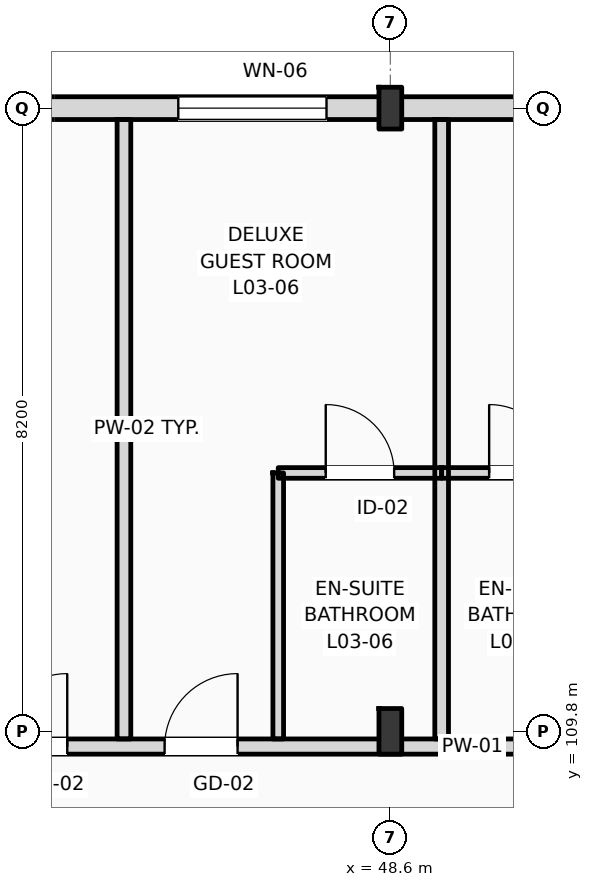
"""IFC4 building model, lengths in metres.
Left out: names, types, materials, properties, quantities, classifications, styles, units other than length and angle.
Written with IfcOpenShell. Run it as: python <this file> out.ifc"""

import sys

from ifc_helpers import new_model, si_unit, direction, frame, frame_2d, origin, origin_2d, place, context, subcontext, project, spatial, rectangle, i_section, extrude, element, fill, save


model = new_model("IFC4")
c1 = context("Model", 3, precision=1e-05, world=origin(), true_north=direction((0.0, 1.0)))
c2 = subcontext(c1, "Body", "Model", "MODEL_VIEW")
j1 = project(units=[si_unit("LENGTHUNIT", "METRE"), si_unit("PLANEANGLEUNIT", "RADIAN")], contexts=[c1])
p1 = place(None, origin())
s1 = spatial("IfcSite", under=j1, at=p1, CompositionType="ELEMENT")
p2 = place(p1, origin())
s2 = spatial("IfcBuilding", under=s1, at=p2, CompositionType="ELEMENT")
p3 = place(p2, frame((0.0, 0.0, 16.2)))
s3 = spatial("IfcBuildingStorey", under=s2, at=p3, CompositionType="ELEMENT", Elevation=16.2)
p4 = place(p3, frame((48.6, 109.8, 0.0), z_axis=(0.0, 0.0, 1.0), x_axis=(1.0, 0.0, 0.0)))
e1 = element("IfcColumn", 1, at=p4, inside=s3, PredefinedType="COLUMN", context=c2, shape_type="SweptSolid", body=[
    extrude(i_section(OverallWidth=0.3, OverallDepth=0.6, WebThickness=0.015, FlangeThickness=0.03, FilletRadius=0.027, at=origin_2d()), origin(), (0.0, 0.0, 1.0), 4.2),
])
p5 = place(p3, frame((48.6, 118.0, 0.0), z_axis=(0.0, 0.0, 1.0), x_axis=(1.0, 0.0, 0.0)))
e2 = element("IfcColumn", 2, at=p5, inside=s3, PredefinedType="COLUMN", context=c2, shape_type="SweptSolid", body=[
    extrude(i_section(OverallWidth=0.3, OverallDepth=0.55, WebThickness=0.015, FlangeThickness=0.029, FilletRadius=0.027, at=origin_2d()), origin(), (0.0, 0.0, 1.0), 4.2),
])
p6 = place(p3, frame((22.5, 118.0, 0.0), z_axis=(0.0, 0.0, 1.0), x_axis=(1.0, 0.0, 0.0)))
e3 = element("IfcWall", 3, at=p6, inside=s3, PredefinedType="STANDARD", context=c2, shape_type="SweptSolid", body=[
    extrude(rectangle(XDim=97.5, YDim=0.3, at=frame_2d((48.75, 0.0))), origin(), (0.0, 0.0, 1.0), 3.36),
])
p7 = place(p6, frame((3.721, 0.0, 0.9)))
e4 = element("IfcOpeningElement", 4, at=p7, cuts=e3, PredefinedType="OPENING", context=c2, shape_type="SweptSolid", body=[
    extrude(rectangle(XDim=0.9, YDim=1.8, at=frame_2d((0.45, 0.9))), frame((0.0, 0.16, 0.0), z_axis=(0.0, -1.0, 0.0), x_axis=(1.0, 0.0, 0.0)), (0.0, 0.0, 1.0), 0.32),
])
p8 = place(p6, frame((6.447, 0.0, 0.9)))
e5 = element("IfcOpeningElement", 5, at=p8, cuts=e3, PredefinedType="OPENING", context=c2, shape_type="SweptSolid", body=[
    extrude(rectangle(XDim=1.35, YDim=1.85, at=frame_2d((0.675, 0.925))), frame((0.0, 0.16, 0.0), z_axis=(0.0, -1.0, 0.0), x_axis=(1.0, 0.0, 0.0)), (0.0, 0.0, 1.0), 0.32),
])
p9 = place(p6, frame((11.363, 0.0, 0.9)))
e6 = element("IfcOpeningElement", 6, at=p9, cuts=e3, PredefinedType="OPENING", context=c2, shape_type="SweptSolid", body=[
    extrude(rectangle(XDim=1.5, YDim=1.9, at=frame_2d((0.75, 0.95))), frame((0.0, 0.16, 0.0), z_axis=(0.0, -1.0, 0.0), x_axis=(1.0, 0.0, 0.0)), (0.0, 0.0, 1.0), 0.32),
])
p10 = place(p6, frame((15.078, 0.0, 0.9)))
e7 = element("IfcOpeningElement", 7, at=p10, cuts=e3, PredefinedType="OPENING", context=c2, shape_type="SweptSolid", body=[
    extrude(rectangle(XDim=1.65, YDim=1.95, at=frame_2d((0.825, 0.975))), frame((0.0, 0.16, 0.0), z_axis=(0.0, -1.0, 0.0), x_axis=(1.0, 0.0, 0.0)), (0.0, 0.0, 1.0), 0.32),
])
p11 = place(p6, frame((19.395, 0.0, 0.9)))
e8 = element("IfcOpeningElement", 8, at=p11, cuts=e3, PredefinedType="OPENING", context=c2, shape_type="SweptSolid", body=[
    extrude(rectangle(XDim=1.8, YDim=2.0, at=frame_2d((0.9, 1.0))), frame((0.0, 0.16, 0.0), z_axis=(0.0, -1.0, 0.0), x_axis=(1.0, 0.0, 0.0)), (0.0, 0.0, 1.0), 0.32),
])
p12 = place(p6, frame((23.31, 0.0, 0.9)))
e9 = element("IfcOpeningElement", 9, at=p12, cuts=e3, PredefinedType="OPENING", context=c2, shape_type="SweptSolid", body=[
    extrude(rectangle(XDim=1.95, YDim=2.05, at=frame_2d((0.975, 1.025))), frame((0.0, 0.16, 0.0), z_axis=(0.0, -1.0, 0.0), x_axis=(1.0, 0.0, 0.0)), (0.0, 0.0, 1.0), 0.32),
])
p13 = place(p6, frame((28.026, 0.0, 0.9)))
e10 = element("IfcOpeningElement", 10, at=p13, cuts=e3, PredefinedType="OPENING", context=c2, shape_type="SweptSolid", body=[
    extrude(rectangle(XDim=2.1, YDim=2.1, at=frame_2d((1.05, 1.05))), frame((0.0, 0.16, 0.0), z_axis=(0.0, -1.0, 0.0), x_axis=(1.0, 0.0, 0.0)), (0.0, 0.0, 1.0), 0.32),
])
p14 = place(p6, frame((31.941, 0.0, 0.9)))
e11 = element("IfcOpeningElement", 11, at=p14, cuts=e3, PredefinedType="OPENING", context=c2, shape_type="SweptSolid", body=[
    extrude(rectangle(XDim=1.1, YDim=2.15, at=frame_2d((0.55, 1.075))), frame((0.0, 0.16, 0.0), z_axis=(0.0, -1.0, 0.0), x_axis=(1.0, 0.0, 0.0)), (0.0, 0.0, 1.0), 0.32),
])
p15 = place(p6, frame((36.657, 0.0, 0.9)))
e12 = element("IfcOpeningElement", 12, at=p15, cuts=e3, PredefinedType="OPENING", context=c2, shape_type="SweptSolid", body=[
    extrude(rectangle(XDim=2.4, YDim=2.2, at=frame_2d((1.2, 1.1))), frame((0.0, 0.16, 0.0), z_axis=(0.0, -1.0, 0.0), x_axis=(1.0, 0.0, 0.0)), (0.0, 0.0, 1.0), 0.32),
])
p16 = place(p6, frame((42.574, 0.0, 0.9)))
e13 = element("IfcOpeningElement", 13, at=p16, cuts=e3, PredefinedType="OPENING", context=c2, shape_type="SweptSolid", body=[
    extrude(rectangle(XDim=1.35, YDim=2.25, at=frame_2d((0.675, 1.125))), frame((0.0, 0.16, 0.0), z_axis=(0.0, -1.0, 0.0), x_axis=(1.0, 0.0, 0.0)), (0.0, 0.0, 1.0), 0.32),
])
p17 = place(p6, frame((45.289, 0.0, 0.9)))
e14 = element("IfcOpeningElement", 14, at=p17, cuts=e3, PredefinedType="OPENING", context=c2, shape_type="SweptSolid", body=[
    extrude(rectangle(XDim=2.7, YDim=2.28, at=frame_2d((1.35, 1.14))), frame((0.0, 0.16, 0.0), z_axis=(0.0, -1.0, 0.0), x_axis=(1.0, 0.0, 0.0)), (0.0, 0.0, 1.0), 0.32),
])
p18 = place(p6, frame((50.406, 0.0, 0.9)))
e15 = element("IfcOpeningElement", 15, at=p18, cuts=e3, PredefinedType="OPENING", context=c2, shape_type="SweptSolid", body=[
    extrude(rectangle(XDim=1.8, YDim=2.28, at=frame_2d((0.9, 1.14))), frame((0.0, 0.16, 0.0), z_axis=(0.0, -1.0, 0.0), x_axis=(1.0, 0.0, 0.0)), (0.0, 0.0, 1.0), 0.32),
])
p19 = place(p6, frame((53.922, 0.0, 0.9)))
e16 = element("IfcOpeningElement", 16, at=p19, cuts=e3, PredefinedType="OPENING", context=c2, shape_type="SweptSolid", body=[
    extrude(rectangle(XDim=1.8, YDim=2.28, at=frame_2d((0.9, 1.14))), frame((0.0, 0.16, 0.0), z_axis=(0.0, -1.0, 0.0), x_axis=(1.0, 0.0, 0.0)), (0.0, 0.0, 1.0), 0.32),
])
p20 = place(p6, frame((58.332, 0.0, 0.9)))
e17 = element("IfcOpeningElement", 17, at=p20, cuts=e3, PredefinedType="OPENING", context=c2, shape_type="SweptSolid", body=[
    extrude(rectangle(XDim=2.961, YDim=2.28, at=frame_2d((1.48, 1.14))), frame((0.0, 0.16, 0.0), z_axis=(0.0, -1.0, 0.0), x_axis=(1.0, 0.0, 0.0)), (0.0, 0.0, 1.0), 0.32),
])
p21 = place(p6, frame((62.513, 0.0, 0.9)))
e18 = element("IfcOpeningElement", 18, at=p21, cuts=e3, PredefinedType="OPENING", context=c2, shape_type="SweptSolid", body=[
    extrude(rectangle(XDim=1.8, YDim=2.28, at=frame_2d((0.9, 1.14))), frame((0.0, 0.16, 0.0), z_axis=(0.0, -1.0, 0.0), x_axis=(1.0, 0.0, 0.0)), (0.0, 0.0, 1.0), 0.32),
])
p22 = place(p6, frame((67.114, 0.0, 0.9)))
e19 = element("IfcOpeningElement", 19, at=p22, cuts=e3, PredefinedType="OPENING", context=c2, shape_type="SweptSolid", body=[
    extrude(rectangle(XDim=2.961, YDim=2.28, at=frame_2d((1.48, 1.14))), frame((0.0, 0.16, 0.0), z_axis=(0.0, -1.0, 0.0), x_axis=(1.0, 0.0, 0.0)), (0.0, 0.0, 1.0), 0.32),
])
p23 = place(p6, frame((73.695, 0.0, 0.9)))
e20 = element("IfcOpeningElement", 20, at=p23, cuts=e3, PredefinedType="OPENING", context=c2, shape_type="SweptSolid", body=[
    extrude(rectangle(XDim=1.1, YDim=2.28, at=frame_2d((0.55, 1.14))), frame((0.0, 0.16, 0.0), z_axis=(0.0, -1.0, 0.0), x_axis=(1.0, 0.0, 0.0)), (0.0, 0.0, 1.0), 0.32),
])
p24 = place(p6, frame((75.895, 0.0, 0.9)))
e21 = element("IfcOpeningElement", 21, at=p24, cuts=e3, PredefinedType="OPENING", context=c2, shape_type="SweptSolid", body=[
    extrude(rectangle(XDim=2.961, YDim=2.28, at=frame_2d((1.48, 1.14))), frame((0.0, 0.16, 0.0), z_axis=(0.0, -1.0, 0.0), x_axis=(1.0, 0.0, 0.0)), (0.0, 0.0, 1.0), 0.32),
])
p25 = place(p6, frame((81.676, 0.0, 0.9)))
e22 = element("IfcOpeningElement", 22, at=p25, cuts=e3, PredefinedType="OPENING", context=c2, shape_type="SweptSolid", body=[
    extrude(rectangle(XDim=1.8, YDim=2.28, at=frame_2d((0.9, 1.14))), frame((0.0, 0.16, 0.0), z_axis=(0.0, -1.0, 0.0), x_axis=(1.0, 0.0, 0.0)), (0.0, 0.0, 1.0), 0.32),
])
p26 = place(p6, frame((84.677, 0.0, 0.9)))
e23 = element("IfcOpeningElement", 23, at=p26, cuts=e3, PredefinedType="OPENING", context=c2, shape_type="SweptSolid", body=[
    extrude(rectangle(XDim=2.961, YDim=2.28, at=frame_2d((1.48, 1.14))), frame((0.0, 0.16, 0.0), z_axis=(0.0, -1.0, 0.0), x_axis=(1.0, 0.0, 0.0)), (0.0, 0.0, 1.0), 0.32),
])
p27 = place(p6, frame((89.999, 0.0, 0.9)))
e24 = element("IfcOpeningElement", 24, at=p27, cuts=e3, PredefinedType="OPENING", context=c2, shape_type="SweptSolid", body=[
    extrude(rectangle(XDim=1.1, YDim=1.5, at=frame_2d((0.55, 0.75))), frame((0.0, 0.16, 0.0), z_axis=(0.0, -1.0, 0.0), x_axis=(1.0, 0.0, 0.0)), (0.0, 0.0, 1.0), 0.32),
])
p28 = place(p6, frame((94.35, 0.0, 0.9)))
e25 = element("IfcOpeningElement", 25, at=p28, cuts=e3, PredefinedType="OPENING", context=c2, shape_type="SweptSolid", body=[
    extrude(rectangle(XDim=1.25, YDim=1.6, at=frame_2d((0.625, 0.8))), frame((0.0, 0.16, 0.0), z_axis=(0.0, -1.0, 0.0), x_axis=(1.0, 0.0, 0.0)), (0.0, 0.0, 1.0), 0.32),
])
p29 = place(p3, frame((10.65, 109.6, 0.0), z_axis=(0.0, 0.0, 1.0), x_axis=(1.0, 0.0, 0.0)))
e26 = element("IfcWall", 26, at=p29, inside=s3, PredefinedType="PARTITIONING", context=c2, shape_type="SweptSolid", body=[
    extrude(rectangle(XDim=109.21, YDim=0.2, at=frame_2d((54.605, 0.0))), origin(), (0.0, 0.0, 1.0), 3.36),
])
p30 = place(p29, frame((15.43, 0.0, 0.0)))
e27 = element("IfcOpeningElement", 27, at=p30, cuts=e26, PredefinedType="OPENING", context=c2, shape_type="SweptSolid", body=[
    extrude(rectangle(XDim=1.02, YDim=2.2, at=frame_2d((0.51, 1.1))), frame((0.0, 0.11, 0.0), z_axis=(0.0, -1.0, 0.0), x_axis=(1.0, 0.0, 0.0)), (0.0, 0.0, 1.0), 0.22),
])
p31 = place(p29, frame((19.537, 0.0, 0.0)))
e28 = element("IfcOpeningElement", 28, at=p31, cuts=e26, PredefinedType="OPENING", context=c2, shape_type="SweptSolid", body=[
    extrude(rectangle(XDim=1.02, YDim=2.2, at=frame_2d((0.51, 1.1))), frame((0.0, 0.11, 0.0), z_axis=(0.0, -1.0, 0.0), x_axis=(1.0, 0.0, 0.0)), (0.0, 0.0, 1.0), 0.22),
])
p32 = place(p29, frame((23.928, 0.0, 0.0)))
e29 = element("IfcOpeningElement", 29, at=p32, cuts=e26, PredefinedType="OPENING", context=c2, shape_type="SweptSolid", body=[
    extrude(rectangle(XDim=1.02, YDim=2.2, at=frame_2d((0.51, 1.1))), frame((0.0, 0.11, 0.0), z_axis=(0.0, -1.0, 0.0), x_axis=(1.0, 0.0, 0.0)), (0.0, 0.0, 1.0), 0.22),
])
p33 = place(p29, frame((26.169, 0.0, 0.0)))
e30 = element("IfcOpeningElement", 30, at=p33, cuts=e26, PredefinedType="OPENING", context=c2, shape_type="SweptSolid", body=[
    extrude(rectangle(XDim=1.02, YDim=2.2, at=frame_2d((0.51, 1.1))), frame((0.0, 0.11, 0.0), z_axis=(0.0, -1.0, 0.0), x_axis=(1.0, 0.0, 0.0)), (0.0, 0.0, 1.0), 0.22),
])
p34 = place(p29, frame((32.739, 0.0, 0.0)))
e31 = element("IfcOpeningElement", 31, at=p34, cuts=e26, PredefinedType="OPENING", context=c2, shape_type="SweptSolid", body=[
    extrude(rectangle(XDim=0.96, YDim=2.2, at=frame_2d((0.48, 1.1))), frame((0.0, 0.11, 0.0), z_axis=(0.0, -1.0, 0.0), x_axis=(1.0, 0.0, 0.0)), (0.0, 0.0, 1.0), 0.22),
])
p35 = place(p29, frame((34.98, 0.0, 0.0)))
e32 = element("IfcOpeningElement", 32, at=p35, cuts=e26, PredefinedType="OPENING", context=c2, shape_type="SweptSolid", body=[
    extrude(rectangle(XDim=0.96, YDim=2.2, at=frame_2d((0.48, 1.1))), frame((0.0, 0.11, 0.0), z_axis=(0.0, -1.0, 0.0), x_axis=(1.0, 0.0, 0.0)), (0.0, 0.0, 1.0), 0.22),
])
p36 = place(p29, frame((41.521, 0.0, 0.0)))
e33 = element("IfcOpeningElement", 33, at=p36, cuts=e26, PredefinedType="OPENING", context=c2, shape_type="SweptSolid", body=[
    extrude(rectangle(XDim=0.96, YDim=2.2, at=frame_2d((0.48, 1.1))), frame((0.0, 0.11, 0.0), z_axis=(0.0, -1.0, 0.0), x_axis=(1.0, 0.0, 0.0)), (0.0, 0.0, 1.0), 0.22),
])
p37 = place(p29, frame((43.512, 0.0, 0.0)))
e34 = element("IfcOpeningElement", 34, at=p37, cuts=e26, PredefinedType="OPENING", context=c2, shape_type="SweptSolid", body=[
    extrude(rectangle(XDim=0.96, YDim=2.2, at=frame_2d((0.48, 1.1))), frame((0.0, 0.11, 0.0), z_axis=(0.0, -1.0, 0.0), x_axis=(1.0, 0.0, 0.0)), (0.0, 0.0, 1.0), 0.22),
])
p38 = place(p29, frame((50.303, 0.0, 0.0)))
e35 = element("IfcOpeningElement", 35, at=p38, cuts=e26, PredefinedType="OPENING", context=c2, shape_type="SweptSolid", body=[
    extrude(rectangle(XDim=0.96, YDim=2.2, at=frame_2d((0.48, 1.1))), frame((0.0, 0.11, 0.0), z_axis=(0.0, -1.0, 0.0), x_axis=(1.0, 0.0, 0.0)), (0.0, 0.0, 1.0), 0.22),
])
p39 = place(p29, frame((54.944, 0.0, 0.0)))
e36 = element("IfcOpeningElement", 36, at=p39, cuts=e26, PredefinedType="OPENING", context=c2, shape_type="SweptSolid", body=[
    extrude(rectangle(XDim=0.96, YDim=2.2, at=frame_2d((0.48, 1.1))), frame((0.0, 0.11, 0.0), z_axis=(0.0, -1.0, 0.0), x_axis=(1.0, 0.0, 0.0)), (0.0, 0.0, 1.0), 0.22),
])
p40 = place(p29, frame((59.085, 0.0, 0.0)))
e37 = element("IfcOpeningElement", 37, at=p40, cuts=e26, PredefinedType="OPENING", context=c2, shape_type="SweptSolid", body=[
    extrude(rectangle(XDim=0.96, YDim=2.2, at=frame_2d((0.48, 1.1))), frame((0.0, 0.11, 0.0), z_axis=(0.0, -1.0, 0.0), x_axis=(1.0, 0.0, 0.0)), (0.0, 0.0, 1.0), 0.22),
])
p41 = place(p29, frame((63.476, 0.0, 0.0)))
e38 = element("IfcOpeningElement", 38, at=p41, cuts=e26, PredefinedType="OPENING", context=c2, shape_type="SweptSolid", body=[
    extrude(rectangle(XDim=0.96, YDim=2.2, at=frame_2d((0.48, 1.1))), frame((0.0, 0.11, 0.0), z_axis=(0.0, -1.0, 0.0), x_axis=(1.0, 0.0, 0.0)), (0.0, 0.0, 1.0), 0.22),
])
p42 = place(p29, frame((65.716, 0.0, 0.0)))
e39 = element("IfcOpeningElement", 39, at=p42, cuts=e26, PredefinedType="OPENING", context=c2, shape_type="SweptSolid", body=[
    extrude(rectangle(XDim=0.96, YDim=2.2, at=frame_2d((0.48, 1.1))), frame((0.0, 0.11, 0.0), z_axis=(0.0, -1.0, 0.0), x_axis=(1.0, 0.0, 0.0)), (0.0, 0.0, 1.0), 0.22),
])
p43 = place(p29, frame((72.257, 0.0, 0.0)))
e40 = element("IfcOpeningElement", 40, at=p43, cuts=e26, PredefinedType="OPENING", context=c2, shape_type="SweptSolid", body=[
    extrude(rectangle(XDim=0.96, YDim=2.2, at=frame_2d((0.48, 1.1))), frame((0.0, 0.11, 0.0), z_axis=(0.0, -1.0, 0.0), x_axis=(1.0, 0.0, 0.0)), (0.0, 0.0, 1.0), 0.22),
])
p44 = place(p29, frame((74.498, 0.0, 0.0)))
e41 = element("IfcOpeningElement", 41, at=p44, cuts=e26, PredefinedType="OPENING", context=c2, shape_type="SweptSolid", body=[
    extrude(rectangle(XDim=0.96, YDim=2.2, at=frame_2d((0.48, 1.1))), frame((0.0, 0.11, 0.0), z_axis=(0.0, -1.0, 0.0), x_axis=(1.0, 0.0, 0.0)), (0.0, 0.0, 1.0), 0.22),
])
p45 = place(p29, frame((81.039, 0.0, 0.0)))
e42 = element("IfcOpeningElement", 42, at=p45, cuts=e26, PredefinedType="OPENING", context=c2, shape_type="SweptSolid", body=[
    extrude(rectangle(XDim=0.96, YDim=2.2, at=frame_2d((0.48, 1.1))), frame((0.0, 0.11, 0.0), z_axis=(0.0, -1.0, 0.0), x_axis=(1.0, 0.0, 0.0)), (0.0, 0.0, 1.0), 0.22),
])
p46 = place(p29, frame((85.68, 0.0, 0.0)))
e43 = element("IfcOpeningElement", 43, at=p46, cuts=e26, PredefinedType="OPENING", context=c2, shape_type="SweptSolid", body=[
    extrude(rectangle(XDim=0.96, YDim=2.2, at=frame_2d((0.48, 1.1))), frame((0.0, 0.11, 0.0), z_axis=(0.0, -1.0, 0.0), x_axis=(1.0, 0.0, 0.0)), (0.0, 0.0, 1.0), 0.22),
])
p47 = place(p29, frame((89.82, 0.0, 0.0)))
e44 = element("IfcOpeningElement", 44, at=p47, cuts=e26, PredefinedType="OPENING", context=c2, shape_type="SweptSolid", body=[
    extrude(rectangle(XDim=0.96, YDim=2.2, at=frame_2d((0.48, 1.1))), frame((0.0, 0.11, 0.0), z_axis=(0.0, -1.0, 0.0), x_axis=(1.0, 0.0, 0.0)), (0.0, 0.0, 1.0), 0.22),
])
p48 = place(p29, frame((94.211, 0.0, 0.0)))
e45 = element("IfcOpeningElement", 45, at=p48, cuts=e26, PredefinedType="OPENING", context=c2, shape_type="SweptSolid", body=[
    extrude(rectangle(XDim=0.96, YDim=2.2, at=frame_2d((0.48, 1.1))), frame((0.0, 0.11, 0.0), z_axis=(0.0, -1.0, 0.0), x_axis=(1.0, 0.0, 0.0)), (0.0, 0.0, 1.0), 0.22),
])
p49 = place(p29, frame((98.602, 0.0, 0.0)))
e46 = element("IfcOpeningElement", 46, at=p49, cuts=e26, PredefinedType="OPENING", context=c2, shape_type="SweptSolid", body=[
    extrude(rectangle(XDim=0.96, YDim=2.2, at=frame_2d((0.48, 1.1))), frame((0.0, 0.11, 0.0), z_axis=(0.0, -1.0, 0.0), x_axis=(1.0, 0.0, 0.0)), (0.0, 0.0, 1.0), 0.22),
])
p50 = place(p29, frame((102.993, 0.0, 0.0)))
e47 = element("IfcOpeningElement", 47, at=p50, cuts=e26, PredefinedType="OPENING", context=c2, shape_type="SweptSolid", body=[
    extrude(rectangle(XDim=0.96, YDim=2.2, at=frame_2d((0.48, 1.1))), frame((0.0, 0.11, 0.0), z_axis=(0.0, -1.0, 0.0), x_axis=(1.0, 0.0, 0.0)), (0.0, 0.0, 1.0), 0.22),
])
p51 = place(p29, frame((105.269, 0.0, 0.0)))
e48 = element("IfcOpeningElement", 48, at=p51, cuts=e26, PredefinedType="OPENING", context=c2, shape_type="SweptSolid", body=[
    extrude(rectangle(XDim=0.96, YDim=2.2, at=frame_2d((0.48, 1.1))), frame((0.0, 0.11, 0.0), z_axis=(0.0, -1.0, 0.0), x_axis=(1.0, 0.0, 0.0)), (0.0, 0.0, 1.0), 0.22),
])
p52 = place(p29, frame((2.716, 0.0, 0.0)))
e49 = element("IfcOpeningElement", 49, at=p52, cuts=e26, PredefinedType="OPENING", context=c2, shape_type="SweptSolid", body=[
    extrude(rectangle(XDim=1.35, YDim=2.25, at=frame_2d((0.675, 1.125))), frame((0.0, 0.11, 0.0), z_axis=(0.0, -1.0, 0.0), x_axis=(1.0, 0.0, 0.0)), (0.0, 0.0, 1.0), 0.22),
])
p53 = place(p29, frame((6.65, 0.0, 0.0)))
e50 = element("IfcOpeningElement", 50, at=p53, cuts=e26, PredefinedType="OPENING", context=c2, shape_type="SweptSolid", body=[
    extrude(rectangle(XDim=1.35, YDim=2.25, at=frame_2d((0.675, 1.125))), frame((0.0, 0.11, 0.0), z_axis=(0.0, -1.0, 0.0), x_axis=(1.0, 0.0, 0.0)), (0.0, 0.0, 1.0), 0.22),
])
p54 = place(p29, frame((10.583, 0.0, 0.0)))
e51 = element("IfcOpeningElement", 51, at=p54, cuts=e26, PredefinedType="OPENING", context=c2, shape_type="SweptSolid", body=[
    extrude(rectangle(XDim=1.35, YDim=2.25, at=frame_2d((0.675, 1.125))), frame((0.0, 0.11, 0.0), z_axis=(0.0, -1.0, 0.0), x_axis=(1.0, 0.0, 0.0)), (0.0, 0.0, 1.0), 0.22),
])
for number, where, z_axis, x_axis in (
    (52, (45.095, 109.7, 0.0), (0.0, 0.0, 1.0), (0.0, 1.0, 0.0)),
    (53, (49.275, 109.7, 0.0), (0.0, 0.0, 1.0), (0.0, 1.0, 0.0)),
):
    element("IfcWall", number, at=place(p3, frame(where, z_axis=z_axis, x_axis=x_axis)), inside=s3, PredefinedType="PARTITIONING", context=c2, shape_type="SweptSolid", body=[
        extrude(rectangle(XDim=8.15, YDim=0.18, at=frame_2d((4.075, 0.0))), origin(), (0.0, 0.0, 1.0), 3.92),
    ])
p55 = place(p3, frame((47.125, 109.7, 0.0), z_axis=(0.0, 0.0, 1.0), x_axis=(0.0, 1.0, 0.0)))
e54 = element("IfcWall", 54, at=p55, inside=s3, PredefinedType="PARTITIONING", context=c2, shape_type="SweptSolid", body=[
    extrude(rectangle(XDim=3.5, YDim=0.14, at=frame_2d((1.75, 0.0))), origin(), (0.0, 0.0, 1.0), 3.92),
])
p56 = place(p3, frame((47.125, 113.2, 0.0), z_axis=(0.0, 0.0, 1.0), x_axis=(1.0, 0.0, 0.0)))
e55 = element("IfcWall", 55, at=p56, inside=s3, PredefinedType="PARTITIONING", context=c2, shape_type="SweptSolid", body=[
    extrude(rectangle(XDim=2.15, YDim=0.14, at=frame_2d((1.075, 0.0))), origin(), (0.0, 0.0, 1.0), 3.92),
])
p57 = place(p56, frame((0.625, 0.0, 0.0)))
e56 = element("IfcOpeningElement", 56, at=p57, cuts=e55, PredefinedType="OPENING", context=c2, shape_type="SweptSolid", body=[
    extrude(rectangle(XDim=0.9, YDim=2.1, at=frame_2d((0.45, 1.05))), frame((0.0, 0.08, 0.0), z_axis=(0.0, -1.0, 0.0), x_axis=(1.0, 0.0, 0.0)), (0.0, 0.0, 1.0), 0.16),
])
p58 = place(p3, frame((49.275, 113.2, 0.0), z_axis=(0.0, 0.0, 1.0), x_axis=(1.0, 0.0, 0.0)))
e57 = element("IfcWall", 57, at=p58, inside=s3, PredefinedType="PARTITIONING", context=c2, shape_type="SweptSolid", body=[
    extrude(rectangle(XDim=2.15, YDim=0.14, at=frame_2d((1.075, 0.0))), origin(), (0.0, 0.0, 1.0), 3.92),
])
p59 = place(p58, frame((0.625, 0.0, 0.0)))
e58 = element("IfcOpeningElement", 58, at=p59, cuts=e57, PredefinedType="OPENING", context=c2, shape_type="SweptSolid", body=[
    extrude(rectangle(XDim=0.9, YDim=2.1, at=frame_2d((0.45, 1.05))), frame((0.0, 0.08, 0.0), z_axis=(0.0, -1.0, 0.0), x_axis=(1.0, 0.0, 0.0)), (0.0, 0.0, 1.0), 0.16),
])
p60 = place(p12, origin())
e59 = element("IfcWindow", 59, at=p60, inside=s3, PartitioningType="DOUBLE_PANEL_VERTICAL", PredefinedType="WINDOW", context=c2, shape_type="SweptSolid", body=[
    extrude(rectangle(XDim=1.95, YDim=2.05, at=frame_2d((0.975, 1.025))), frame((0.0, 0.03, 0.0), z_axis=(0.0, -1.0, 0.0), x_axis=(1.0, 0.0, 0.0)), (0.0, 0.0, 1.0), 0.06),
])
fill(e9, e59)
p61 = place(p34, origin())
e60 = element("IfcDoor", 60, at=p61, inside=s3, OperationType="SINGLE_SWING_RIGHT", PredefinedType="DOOR", context=c2, shape_type="SweptSolid", body=[
    extrude(rectangle(XDim=0.96, YDim=2.2, at=frame_2d((0.48, 1.1))), frame((0.0, 0.025, 0.0), z_axis=(0.0, -1.0, 0.0), x_axis=(1.0, 0.0, 0.0)), (0.0, 0.0, 1.0), 0.05),
])
fill(e31, e60)
p62 = place(p35, origin())
e61 = element("IfcDoor", 61, at=p62, inside=s3, OperationType="SINGLE_SWING_RIGHT", PredefinedType="DOOR", context=c2, shape_type="SweptSolid", body=[
    extrude(rectangle(XDim=0.96, YDim=2.2, at=frame_2d((0.48, 1.1))), frame((0.0, 0.025, 0.0), z_axis=(0.0, -1.0, 0.0), x_axis=(1.0, 0.0, 0.0)), (0.0, 0.0, 1.0), 0.05),
])
fill(e32, e61)
p63 = place(p57, origin())
e62 = element("IfcDoor", 62, at=p63, inside=s3, OperationType="SINGLE_SWING_LEFT", PredefinedType="DOOR", context=c2, shape_type="SweptSolid", body=[
    extrude(rectangle(XDim=0.9, YDim=2.1, at=frame_2d((0.45, 1.05))), frame((0.0, 0.025, 0.0), z_axis=(0.0, -1.0, 0.0), x_axis=(1.0, 0.0, 0.0)), (0.0, 0.0, 1.0), 0.05),
])
fill(e56, e62)
p64 = place(p59, origin())
e63 = element("IfcDoor", 63, at=p64, inside=s3, OperationType="SINGLE_SWING_LEFT", PredefinedType="DOOR", context=c2, shape_type="SweptSolid", body=[
    extrude(rectangle(XDim=0.9, YDim=2.1, at=frame_2d((0.45, 1.05))), frame((0.0, 0.025, 0.0), z_axis=(0.0, -1.0, 0.0), x_axis=(1.0, 0.0, 0.0)), (0.0, 0.0, 1.0), 0.05),
])
fill(e58, e63)
save(model, sys.argv[1])
